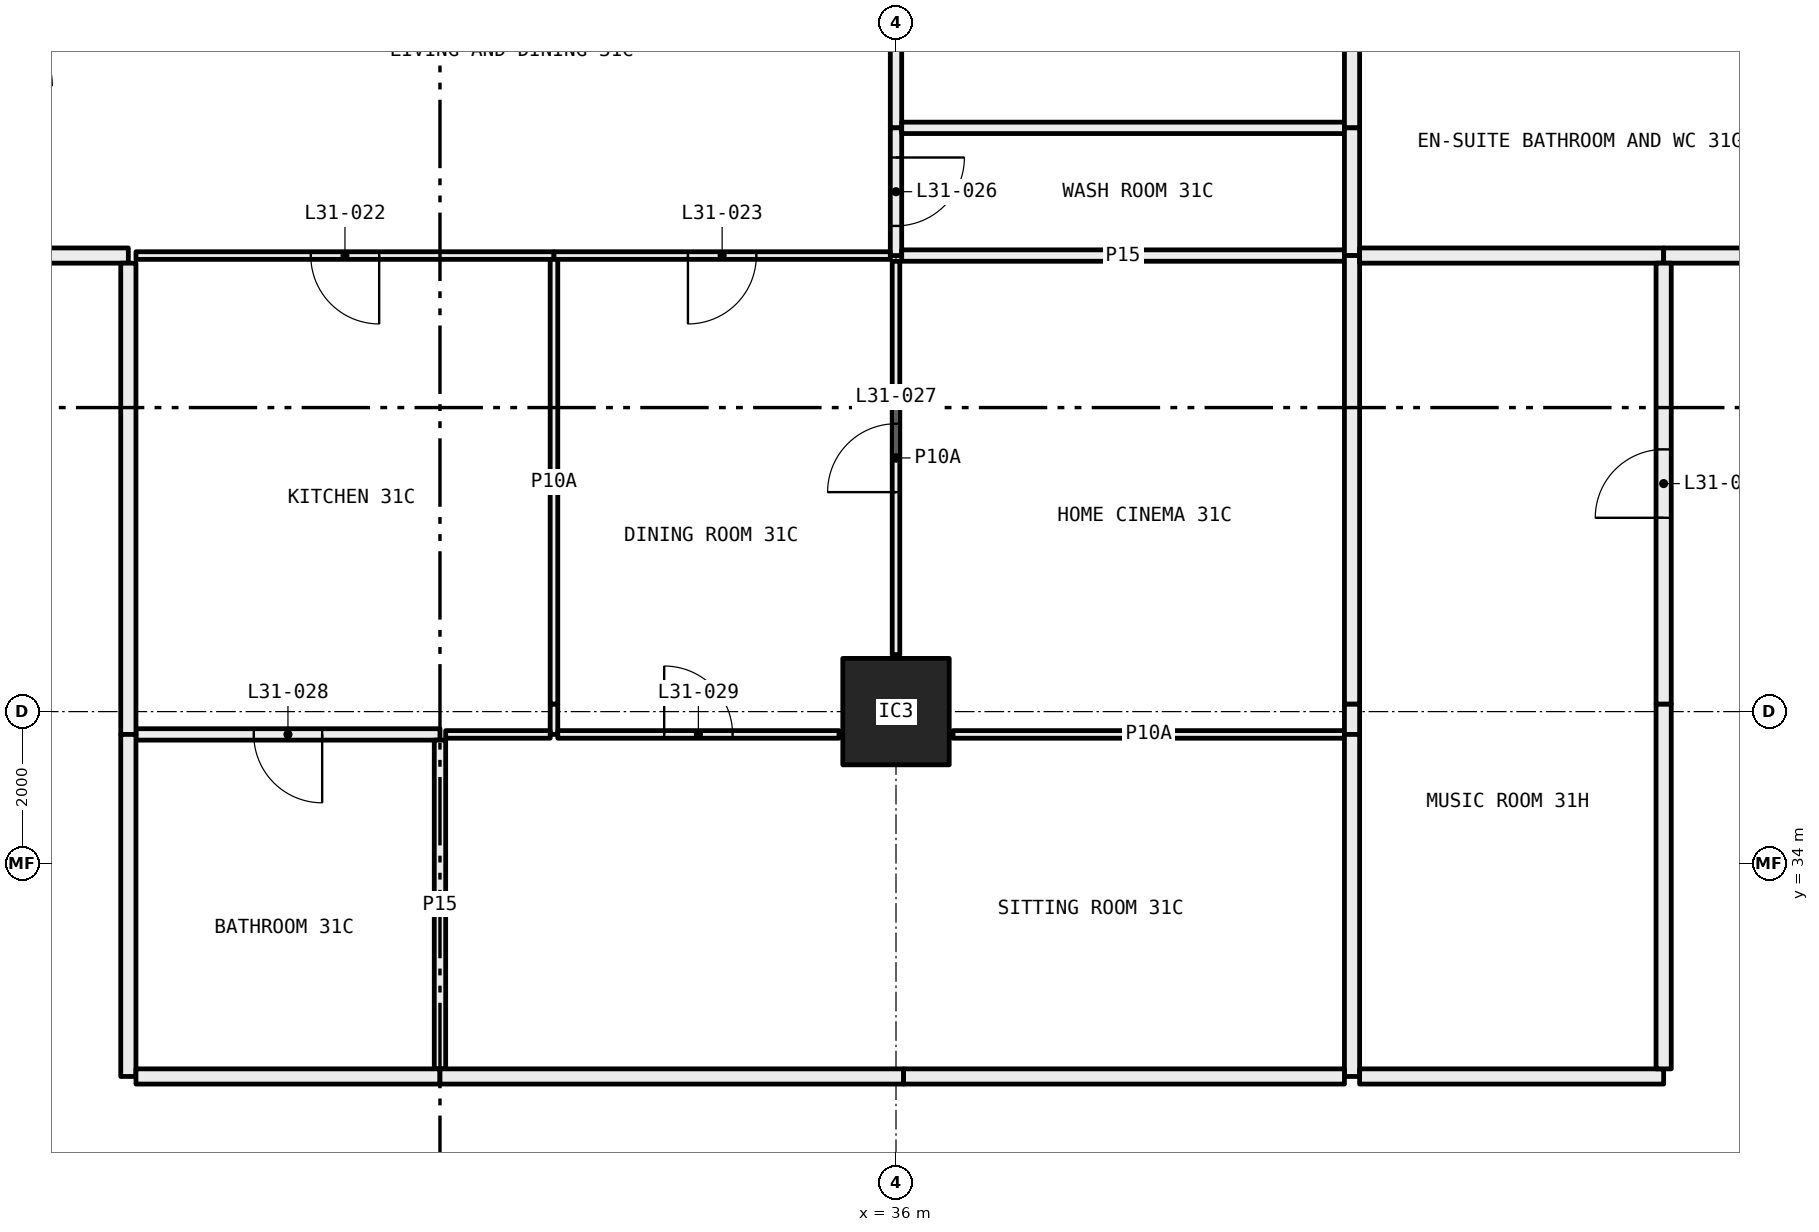
"""IFC4 building model, lengths in metres.
Left out: names, types, materials, properties, quantities, classifications, styles, units other than length and angle.
Written with IfcOpenShell. Run it as: python <this file> out.ifc"""

import sys

from ifc_helpers import new_model, si_unit, direction, frame, frame_2d, origin, origin_2d, place, context, subcontext, project, spatial, rectangle, hollow_rectangle, extrude, element, fill, save


model = new_model("IFC4")
c1 = context("Model", 3, precision=1e-05, world=origin(), true_north=direction((0.0, 1.0)))
c2 = subcontext(c1, "Body", "Model", "MODEL_VIEW")
j1 = project(units=[si_unit("LENGTHUNIT", "METRE"), si_unit("PLANEANGLEUNIT", "RADIAN")], contexts=[c1])
p1 = place(None, origin())
s1 = spatial("IfcSite", under=j1, at=p1, CompositionType="ELEMENT")
p2 = place(p1, origin())
s2 = spatial("IfcBuilding", under=s1, at=p2, CompositionType="ELEMENT")
p3 = place(p2, frame((0.0, 0.0, 120.75)))
s3 = spatial("IfcBuildingStorey", under=s2, at=p3, CompositionType="ELEMENT", Elevation=120.75)
p4 = place(p3, frame((36.0, 36.0, 0.0), z_axis=(0.0, 0.0, 1.0), x_axis=(1.0, 0.0, 0.0)))
e1 = element("IfcColumn", 1, at=p4, inside=s3, PredefinedType="COLUMN", context=c2, shape_type="SweptSolid", body=[
    extrude(hollow_rectangle(XDim=1.4, YDim=1.4, WallThickness=0.06, at=origin_2d()), origin(), (0.0, 0.0, 1.0), 3.05),
])
p5 = place(p3, frame((36.0, 43.68, 0.0), z_axis=(0.0, 0.0, 1.0), x_axis=(0.0, 1.0, 0.0)))
e2 = element("IfcWall", 2, at=p5, inside=s3, PredefinedType="PARTITIONING", context=c2, shape_type="SweptSolid", body=[
    extrude(rectangle(XDim=3.6, YDim=0.15, at=frame_2d((1.8, 0.0))), origin(), (0.0, 0.0, 1.0), 2.45),
])
p6 = place(p5, frame((1.35, 0.0, 0.0)))
e3 = element("IfcOpeningElement", 3, at=p6, cuts=e2, PredefinedType="OPENING", context=c2, shape_type="SweptSolid", body=[
    extrude(rectangle(XDim=0.9, YDim=2.1, at=frame_2d((0.45, 1.05))), frame((0.0, 0.085, 0.0), z_axis=(0.0, -1.0, 0.0), x_axis=(1.0, 0.0, 0.0)), (0.0, 0.0, 1.0), 0.17),
])
p7 = place(p3, frame((36.0, 42.0, 0.0), z_axis=(0.0, 0.0, 1.0), x_axis=(0.0, 1.0, 0.0)))
e4 = element("IfcWall", 4, at=p7, inside=s3, PredefinedType="PARTITIONING", context=c2, shape_type="SweptSolid", body=[
    extrude(rectangle(XDim=1.68, YDim=0.15, at=frame_2d((0.84, 0.0))), origin(), (0.0, 0.0, 1.0), 2.45),
])
p8 = place(p7, frame((0.39, 0.0, 0.0)))
e5 = element("IfcOpeningElement", 5, at=p8, cuts=e4, PredefinedType="OPENING", context=c2, shape_type="SweptSolid", body=[
    extrude(rectangle(XDim=0.9, YDim=2.1, at=frame_2d((0.45, 1.05))), frame((0.0, 0.085, 0.0), z_axis=(0.0, -1.0, 0.0), x_axis=(1.0, 0.0, 0.0)), (0.0, 0.0, 1.0), 0.17),
])
p9 = place(p3, frame((26.0, 42.0, 0.0), z_axis=(0.0, 0.0, 1.0), x_axis=(1.0, 0.0, 0.0)))
e6 = element("IfcWall", 6, at=p9, inside=s3, PredefinedType="PARTITIONING", context=c2, shape_type="SweptSolid", body=[
    extrude(rectangle(XDim=5.5, YDim=0.1, at=frame_2d((2.75, 0.0))), origin(), (0.0, 0.0, 1.0), 3.05),
])
p10 = place(p9, frame((2.3, 0.0, 0.0)))
e7 = element("IfcOpeningElement", 7, at=p10, cuts=e6, PredefinedType="OPENING", context=c2, shape_type="SweptSolid", body=[
    extrude(rectangle(XDim=0.9, YDim=2.1, at=frame_2d((0.45, 1.05))), frame((0.0, 0.06, 0.0), z_axis=(0.0, -1.0, 0.0), x_axis=(1.0, 0.0, 0.0)), (0.0, 0.0, 1.0), 0.12),
])
p11 = place(p3, frame((31.5, 42.0, 0.0), z_axis=(0.0, 0.0, 1.0), x_axis=(1.0, 0.0, 0.0)))
e8 = element("IfcWall", 8, at=p11, inside=s3, PredefinedType="PARTITIONING", context=c2, shape_type="SweptSolid", body=[
    extrude(rectangle(XDim=4.425, YDim=0.1, at=frame_2d((2.212, 0.0))), origin(), (0.0, 0.0, 1.0), 2.45),
])
p12 = place(p11, frame((1.762, 0.0, 0.0)))
e9 = element("IfcOpeningElement", 9, at=p12, cuts=e8, PredefinedType="OPENING", context=c2, shape_type="SweptSolid", body=[
    extrude(rectangle(XDim=0.9, YDim=2.1, at=frame_2d((0.45, 1.05))), frame((0.0, 0.06, 0.0), z_axis=(0.0, -1.0, 0.0), x_axis=(1.0, 0.0, 0.0)), (0.0, 0.0, 1.0), 0.12),
])
p13 = place(p3, frame((24.0, 42.0, 0.0), z_axis=(0.0, 0.0, 1.0), x_axis=(1.0, 0.0, 0.0)))
e10 = element("IfcWall", 10, at=p13, inside=s3, PredefinedType="PARTITIONING", context=c2, shape_type="SweptSolid", body=[
    extrude(rectangle(XDim=1.9, YDim=0.2, at=frame_2d((0.95, 0.0))), origin(), (0.0, 0.0, 1.0), 3.05),
])
p14 = place(p3, frame((36.075, 43.68, 0.0), z_axis=(0.0, 0.0, 1.0), x_axis=(1.0, 0.0, 0.0)))
e11 = element("IfcWall", 11, at=p14, inside=s3, PredefinedType="PARTITIONING", context=c2, shape_type="SweptSolid", body=[
    extrude(rectangle(XDim=5.825, YDim=0.15, at=frame_2d((2.913, 0.0))), origin(), (0.0, 0.0, 1.0), 2.45),
])
p15 = place(p3, frame((42.0, 43.68, 0.0), z_axis=(0.0, 0.0, 1.0), x_axis=(0.0, 1.0, 0.0)))
e12 = element("IfcWall", 12, at=p15, inside=s3, PredefinedType="PARTITIONING", context=c2, shape_type="SweptSolid", body=[
    extrude(rectangle(XDim=1.32, YDim=0.2, at=frame_2d((0.66, 0.0))), origin(), (0.0, 0.0, 1.0), 3.05),
])
p16 = place(p3, frame((36.075, 42.0, 0.0), z_axis=(0.0, 0.0, 1.0), x_axis=(1.0, 0.0, 0.0)))
e13 = element("IfcWall", 13, at=p16, inside=s3, PredefinedType="PARTITIONING", context=c2, shape_type="SweptSolid", body=[
    extrude(rectangle(XDim=5.825, YDim=0.15, at=frame_2d((2.913, 0.0))), origin(), (0.0, 0.0, 1.0), 2.45),
])
p17 = place(p3, frame((42.0, 42.0, 0.0), z_axis=(0.0, 0.0, 1.0), x_axis=(0.0, 1.0, 0.0)))
e14 = element("IfcWall", 14, at=p17, inside=s3, PredefinedType="PARTITIONING", context=c2, shape_type="SweptSolid", body=[
    extrude(rectangle(XDim=1.68, YDim=0.2, at=frame_2d((0.84, 0.0))), origin(), (0.0, 0.0, 1.0), 3.05),
])
p18 = place(p3, frame((31.5, 35.7, 0.0), z_axis=(0.0, 0.0, 1.0), x_axis=(0.0, 1.0, 0.0)))
e15 = element("IfcWall", 15, at=p18, inside=s3, PredefinedType="PARTITIONING", context=c2, shape_type="SweptSolid", body=[
    extrude(rectangle(XDim=0.4, YDim=0.1, at=frame_2d((0.2, 0.0))), origin(), (0.0, 0.0, 1.0), 2.45),
])
p19 = place(p3, frame((31.5, 36.1, 0.0), z_axis=(0.0, 0.0, 1.0), x_axis=(0.0, 1.0, 0.0)))
e16 = element("IfcWall", 16, at=p19, inside=s3, PredefinedType="PARTITIONING", context=c2, shape_type="SweptSolid", body=[
    extrude(rectangle(XDim=5.85, YDim=0.1, at=frame_2d((2.925, 0.0))), origin(), (0.0, 0.0, 1.0), 3.05),
])
p20 = place(p3, frame((26.0, 35.7, 0.0), z_axis=(0.0, 0.0, 1.0), x_axis=(1.0, 0.0, 0.0)))
e17 = element("IfcWall", 17, at=p20, inside=s3, PredefinedType="PARTITIONING", context=c2, shape_type="SweptSolid", body=[
    extrude(rectangle(XDim=4.0, YDim=0.15, at=frame_2d((2.0, 0.0))), origin(), (0.0, 0.0, 1.0), 3.05),
])
p21 = place(p20, frame((1.55, 0.0, 0.0)))
e18 = element("IfcOpeningElement", 18, at=p21, cuts=e17, PredefinedType="OPENING", context=c2, shape_type="SweptSolid", body=[
    extrude(rectangle(XDim=0.9, YDim=2.1, at=frame_2d((0.45, 1.05))), frame((0.0, 0.085, 0.0), z_axis=(0.0, -1.0, 0.0), x_axis=(1.0, 0.0, 0.0)), (0.0, 0.0, 1.0), 0.17),
])
p22 = place(p3, frame((30.075, 35.7, 0.0), z_axis=(0.0, 0.0, 1.0), x_axis=(1.0, 0.0, 0.0)))
e19 = element("IfcWall", 19, at=p22, inside=s3, PredefinedType="PARTITIONING", context=c2, shape_type="SweptSolid", body=[
    extrude(rectangle(XDim=1.375, YDim=0.1, at=frame_2d((0.688, 0.0))), origin(), (0.0, 0.0, 1.0), 3.05),
])
p23 = place(p3, frame((25.9, 41.9, 0.0), z_axis=(0.0, 0.0, 1.0), x_axis=(0.0, -1.0, 0.0)))
e20 = element("IfcWall", 20, at=p23, inside=s3, PredefinedType="PARTITIONING", context=c2, shape_type="SweptSolid", body=[
    extrude(rectangle(XDim=6.2, YDim=0.2, at=frame_2d((3.1, 0.0))), origin(), (0.0, 0.0, 1.0), 2.45),
])
p24 = place(p3, frame((36.0, 36.75, 0.0), z_axis=(0.0, 0.0, 1.0), x_axis=(0.0, 1.0, 0.0)))
e21 = element("IfcWall", 21, at=p24, inside=s3, PredefinedType="PARTITIONING", context=c2, shape_type="SweptSolid", body=[
    extrude(rectangle(XDim=5.175, YDim=0.1, at=frame_2d((2.587, 0.0))), origin(), (0.0, 0.0, 1.0), 2.45),
])
p25 = place(p24, frame((2.137, 0.0, 0.0)))
e22 = element("IfcOpeningElement", 22, at=p25, cuts=e21, PredefinedType="OPENING", context=c2, shape_type="SweptSolid", body=[
    extrude(rectangle(XDim=0.9, YDim=2.1, at=frame_2d((0.45, 1.05))), frame((0.0, 0.06, 0.0), z_axis=(0.0, -1.0, 0.0), x_axis=(1.0, 0.0, 0.0)), (0.0, 0.0, 1.0), 0.12),
])
p26 = place(p3, frame((31.55, 35.7, 0.0), z_axis=(0.0, 0.0, 1.0), x_axis=(1.0, 0.0, 0.0)))
e23 = element("IfcWall", 23, at=p26, inside=s3, PredefinedType="PARTITIONING", context=c2, shape_type="SweptSolid", body=[
    extrude(rectangle(XDim=3.7, YDim=0.1, at=frame_2d((1.85, 0.0))), origin(), (0.0, 0.0, 1.0), 3.05),
])
p27 = place(p26, frame((1.4, 0.0, 0.0)))
e24 = element("IfcOpeningElement", 24, at=p27, cuts=e23, PredefinedType="OPENING", context=c2, shape_type="SweptSolid", body=[
    extrude(rectangle(XDim=0.9, YDim=2.1, at=frame_2d((0.45, 1.05))), frame((0.0, 0.06, 0.0), z_axis=(0.0, -1.0, 0.0), x_axis=(1.0, 0.0, 0.0)), (0.0, 0.0, 1.0), 0.12),
])
p28 = place(p3, frame((36.75, 35.7, 0.0), z_axis=(0.0, 0.0, 1.0), x_axis=(1.0, 0.0, 0.0)))
e25 = element("IfcWall", 25, at=p28, inside=s3, PredefinedType="PARTITIONING", context=c2, shape_type="SweptSolid", body=[
    extrude(rectangle(XDim=5.15, YDim=0.1, at=frame_2d((2.575, 0.0))), origin(), (0.0, 0.0, 1.0), 3.05),
])
p29 = place(p3, frame((42.0, 35.7, 0.0), z_axis=(0.0, 0.0, 1.0), x_axis=(0.0, 1.0, 0.0)))
e26 = element("IfcWall", 26, at=p29, inside=s3, PredefinedType="PARTITIONING", context=c2, shape_type="SweptSolid", body=[
    extrude(rectangle(XDim=0.4, YDim=0.2, at=frame_2d((0.2, 0.0))), origin(), (0.0, 0.0, 1.0), 2.45),
])
p30 = place(p3, frame((42.0, 36.1, 0.0), z_axis=(0.0, 0.0, 1.0), x_axis=(0.0, 1.0, 0.0)))
e27 = element("IfcWall", 27, at=p30, inside=s3, PredefinedType="PARTITIONING", context=c2, shape_type="SweptSolid", body=[
    extrude(rectangle(XDim=5.9, YDim=0.2, at=frame_2d((2.95, 0.0))), origin(), (0.0, 0.0, 1.0), 3.05),
])
p31 = place(p3, frame((30.0, 31.3, 0.0), z_axis=(0.0, 0.0, 1.0), x_axis=(0.0, 1.0, 0.0)))
e28 = element("IfcWall", 28, at=p31, inside=s3, PredefinedType="PARTITIONING", context=c2, shape_type="SweptSolid", body=[
    extrude(rectangle(XDim=4.325, YDim=0.15, at=frame_2d((2.163, 0.0))), origin(), (0.0, 0.0, 1.0), 3.05),
])
p32 = place(p3, frame((25.9, 35.7, 0.0), z_axis=(0.0, 0.0, 1.0), x_axis=(0.0, -1.0, 0.0)))
e29 = element("IfcWall", 29, at=p32, inside=s3, PredefinedType="PARTITIONING", context=c2, shape_type="SweptSolid", body=[
    extrude(rectangle(XDim=4.5, YDim=0.2, at=frame_2d((2.25, 0.0))), origin(), (0.0, 0.0, 1.0), 3.05),
])
p33 = place(p3, frame((26.0, 31.2, 0.0), z_axis=(0.0, 0.0, 1.0), x_axis=(1.0, 0.0, 0.0)))
e30 = element("IfcWall", 30, at=p33, inside=s3, PredefinedType="PARTITIONING", context=c2, shape_type="SweptSolid", body=[
    extrude(rectangle(XDim=4.0, YDim=0.2, at=frame_2d((2.0, 0.0))), origin(), (0.0, 0.0, 1.0), 3.05),
])
p34 = place(p3, frame((42.0, 31.2, 0.0), z_axis=(0.0, 0.0, 1.0), x_axis=(0.0, 1.0, 0.0)))
e31 = element("IfcWall", 31, at=p34, inside=s3, PredefinedType="PARTITIONING", context=c2, shape_type="SweptSolid", body=[
    extrude(rectangle(XDim=4.5, YDim=0.2, at=frame_2d((2.25, 0.0))), origin(), (0.0, 0.0, 1.0), 3.05),
])
p35 = place(p3, frame((30.0, 31.2, 0.0), z_axis=(0.0, 0.0, 1.0), x_axis=(1.0, 0.0, 0.0)))
e32 = element("IfcWall", 32, at=p35, inside=s3, PredefinedType="PARTITIONING", context=c2, shape_type="SweptSolid", body=[
    extrude(rectangle(XDim=6.1, YDim=0.2, at=frame_2d((3.05, 0.0))), origin(), (0.0, 0.0, 1.0), 2.45),
])
p36 = place(p3, frame((36.1, 31.2, 0.0), z_axis=(0.0, 0.0, 1.0), x_axis=(1.0, 0.0, 0.0)))
e33 = element("IfcWall", 33, at=p36, inside=s3, PredefinedType="PARTITIONING", context=c2, shape_type="SweptSolid", body=[
    extrude(rectangle(XDim=5.8, YDim=0.2, at=frame_2d((2.9, 0.0))), origin(), (0.0, 0.0, 1.0), 3.05),
])
p37 = place(p3, frame((42.1, 42.0, 0.0), z_axis=(0.0, 0.0, 1.0), x_axis=(1.0, 0.0, 0.0)))
e34 = element("IfcWall", 34, at=p37, inside=s3, PredefinedType="PARTITIONING", context=c2, shape_type="SweptSolid", body=[
    extrude(rectangle(XDim=4.0, YDim=0.2, at=frame_2d((2.0, 0.0))), origin(), (0.0, 0.0, 1.0), 3.05),
])
p38 = place(p3, frame((46.1, 42.0, 0.0), z_axis=(0.0, 0.0, 1.0), x_axis=(1.0, 0.0, 0.0)))
e35 = element("IfcWall", 35, at=p38, inside=s3, PredefinedType="PARTITIONING", context=c2, shape_type="SweptSolid", body=[
    extrude(rectangle(XDim=1.9, YDim=0.2, at=frame_2d((0.95, 0.0))), origin(), (0.0, 0.0, 1.0), 3.05),
])
p39 = place(p3, frame((42.1, 31.2, 0.0), z_axis=(0.0, 0.0, 1.0), x_axis=(1.0, 0.0, 0.0)))
e36 = element("IfcWall", 36, at=p39, inside=s3, PredefinedType="PARTITIONING", context=c2, shape_type="SweptSolid", body=[
    extrude(rectangle(XDim=4.0, YDim=0.2, at=frame_2d((2.0, 0.0))), origin(), (0.0, 0.0, 1.0), 3.05),
])
p40 = place(p3, frame((46.1, 31.3, 0.0), z_axis=(0.0, 0.0, 1.0), x_axis=(0.0, 1.0, 0.0)))
e37 = element("IfcWall", 37, at=p40, inside=s3, PredefinedType="PARTITIONING", context=c2, shape_type="SweptSolid", body=[
    extrude(rectangle(XDim=4.8, YDim=0.2, at=frame_2d((2.4, 0.0))), origin(), (0.0, 0.0, 1.0), 2.45),
])
p41 = place(p3, frame((46.1, 36.1, 0.0), z_axis=(0.0, 0.0, 1.0), x_axis=(0.0, 1.0, 0.0)))
e38 = element("IfcWall", 38, at=p41, inside=s3, PredefinedType="PARTITIONING", context=c2, shape_type="SweptSolid", body=[
    extrude(rectangle(XDim=5.8, YDim=0.2, at=frame_2d((2.9, 0.0))), origin(), (0.0, 0.0, 1.0), 3.05),
])
p42 = place(p41, frame((2.45, 0.0, 0.0)))
e39 = element("IfcOpeningElement", 39, at=p42, cuts=e38, PredefinedType="OPENING", context=c2, shape_type="SweptSolid", body=[
    extrude(rectangle(XDim=0.9, YDim=2.1, at=frame_2d((0.45, 1.05))), frame((0.0, 0.11, 0.0), z_axis=(0.0, -1.0, 0.0), x_axis=(1.0, 0.0, 0.0)), (0.0, 0.0, 1.0), 0.22),
])
p43 = place(p10, frame((0.9, 0.0, 0.0), x_axis=(-1.0, 0.0, 0.0)))
e40 = element("IfcDoor", 40, at=p43, inside=s3, OperationType="SINGLE_SWING_RIGHT", PredefinedType="DOOR", context=c2, shape_type="SweptSolid", body=[
    extrude(rectangle(XDim=0.9, YDim=2.1, at=frame_2d((0.45, 1.05))), frame((0.0, 0.025, 0.0), z_axis=(0.0, -1.0, 0.0), x_axis=(1.0, 0.0, 0.0)), (0.0, 0.0, 1.0), 0.05),
])
fill(e7, e40)
p44 = place(p12, frame((0.9, 0.0, 0.0), x_axis=(-1.0, 0.0, 0.0)))
e41 = element("IfcDoor", 41, at=p44, inside=s3, OperationType="SINGLE_SWING_LEFT", PredefinedType="DOOR", context=c2, shape_type="SweptSolid", body=[
    extrude(rectangle(XDim=0.9, YDim=2.1, at=frame_2d((0.45, 1.05))), frame((0.0, 0.025, 0.0), z_axis=(0.0, -1.0, 0.0), x_axis=(1.0, 0.0, 0.0)), (0.0, 0.0, 1.0), 0.05),
])
fill(e9, e41)
p45 = place(p8, frame((0.9, 0.0, 0.0), x_axis=(-1.0, 0.0, 0.0)))
e42 = element("IfcDoor", 42, at=p45, inside=s3, OperationType="SINGLE_SWING_RIGHT", PredefinedType="DOOR", context=c2, shape_type="SweptSolid", body=[
    extrude(rectangle(XDim=0.9, YDim=2.1, at=frame_2d((0.45, 1.05))), frame((0.0, 0.025, 0.0), z_axis=(0.0, -1.0, 0.0), x_axis=(1.0, 0.0, 0.0)), (0.0, 0.0, 1.0), 0.05),
])
fill(e5, e42)
p46 = place(p25, origin())
e43 = element("IfcDoor", 43, at=p46, inside=s3, OperationType="SINGLE_SWING_RIGHT", PredefinedType="DOOR", context=c2, shape_type="SweptSolid", body=[
    extrude(rectangle(XDim=0.9, YDim=2.1, at=frame_2d((0.45, 1.05))), frame((0.0, 0.025, 0.0), z_axis=(0.0, -1.0, 0.0), x_axis=(1.0, 0.0, 0.0)), (0.0, 0.0, 1.0), 0.05),
])
fill(e22, e43)
p47 = place(p21, frame((0.9, 0.0, 0.0), x_axis=(-1.0, 0.0, 0.0)))
e44 = element("IfcDoor", 44, at=p47, inside=s3, OperationType="SINGLE_SWING_RIGHT", PredefinedType="DOOR", context=c2, shape_type="SweptSolid", body=[
    extrude(rectangle(XDim=0.9, YDim=2.1, at=frame_2d((0.45, 1.05))), frame((0.0, 0.025, 0.0), z_axis=(0.0, -1.0, 0.0), x_axis=(1.0, 0.0, 0.0)), (0.0, 0.0, 1.0), 0.05),
])
fill(e18, e44)
p48 = place(p27, origin())
e45 = element("IfcDoor", 45, at=p48, inside=s3, OperationType="SINGLE_SWING_RIGHT", PredefinedType="DOOR", context=c2, shape_type="SweptSolid", body=[
    extrude(rectangle(XDim=0.9, YDim=2.1, at=frame_2d((0.45, 1.05))), frame((0.0, 0.025, 0.0), z_axis=(0.0, -1.0, 0.0), x_axis=(1.0, 0.0, 0.0)), (0.0, 0.0, 1.0), 0.05),
])
fill(e24, e45)
p49 = place(p42, origin())
e46 = element("IfcDoor", 46, at=p49, inside=s3, OperationType="SINGLE_SWING_RIGHT", PredefinedType="DOOR", context=c2, shape_type="SweptSolid", body=[
    extrude(rectangle(XDim=0.9, YDim=2.1, at=frame_2d((0.45, 1.05))), frame((0.0, 0.025, 0.0), z_axis=(0.0, -1.0, 0.0), x_axis=(1.0, 0.0, 0.0)), (0.0, 0.0, 1.0), 0.05),
])
fill(e39, e46)
save(model, sys.argv[1])
